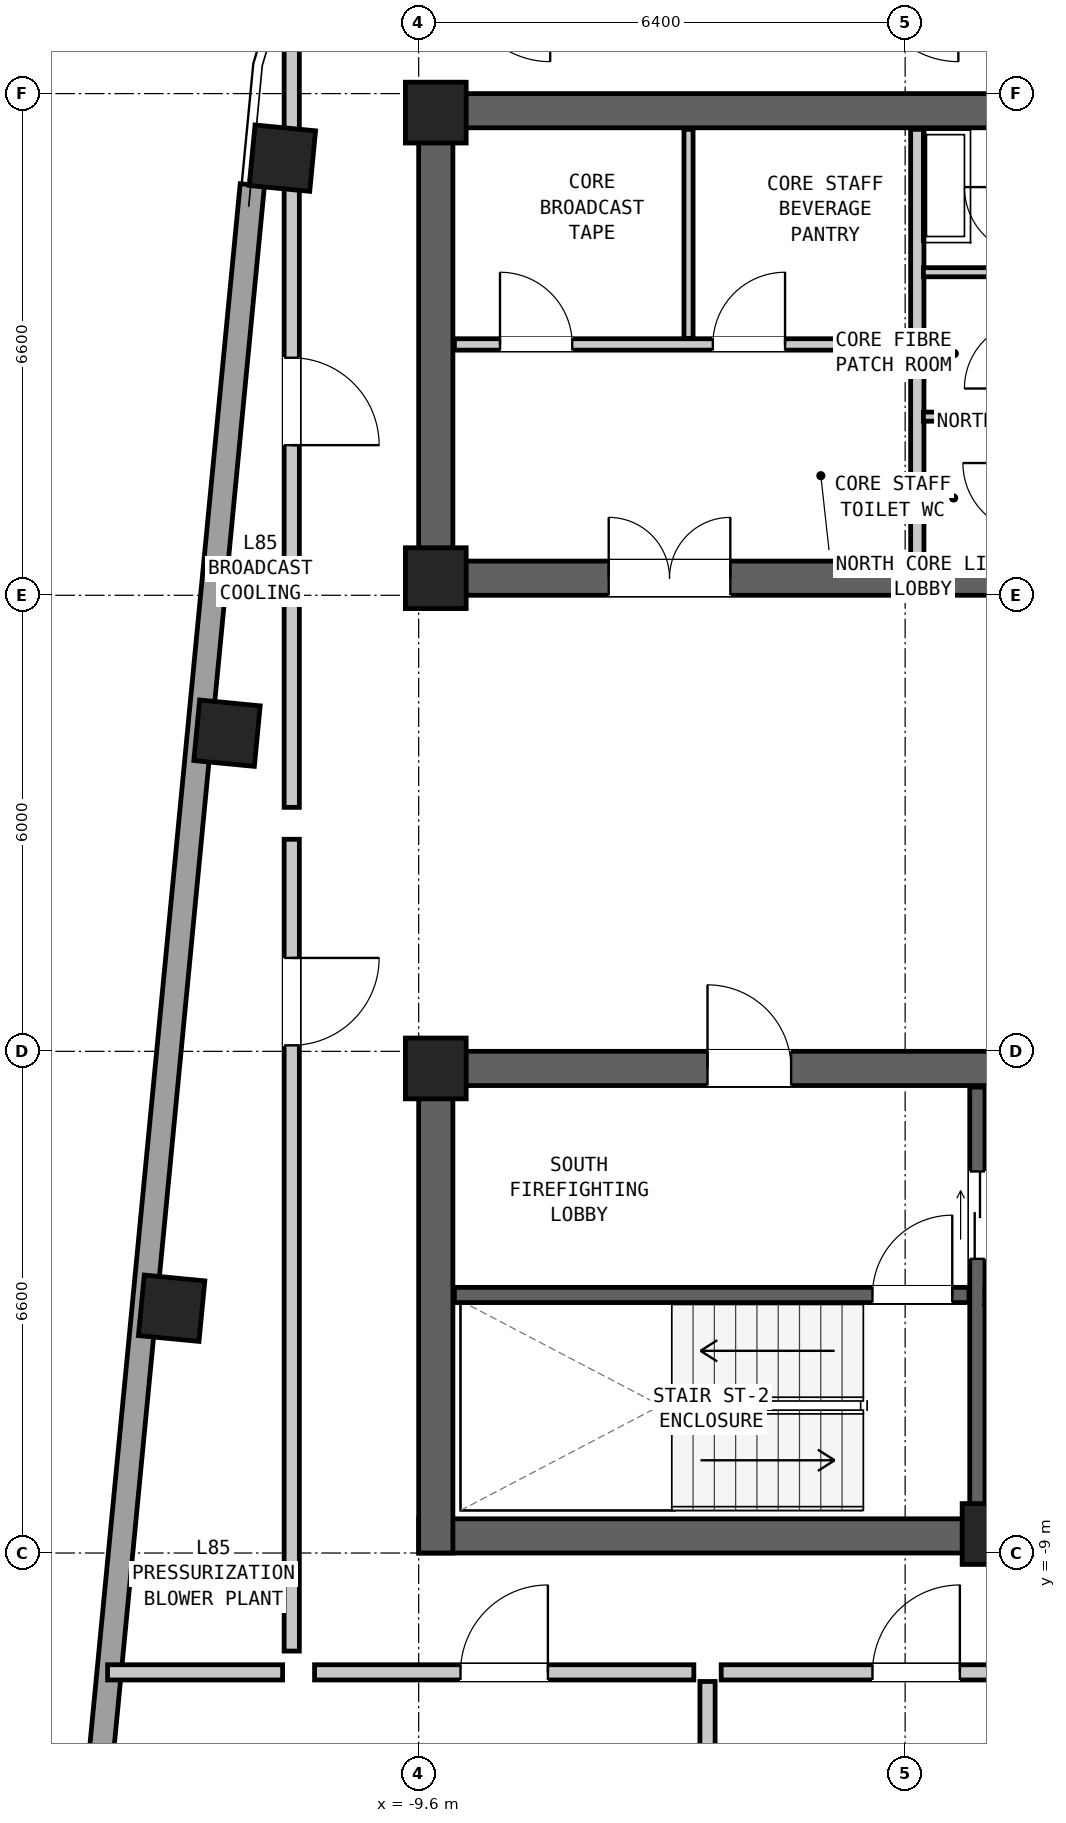
"""IFC4 building model, lengths in metres.
Left out: names, types, materials, properties, quantities, classifications, styles, units other than length and angle.
Written with IfcOpenShell. Run it as: python <this file> out.ifc"""

import sys

from ifc_helpers import new_model, si_unit, direction, frame, frame_2d, origin, origin_2d, place, context, subcontext, project, spatial, rectangle, extrude, element, fill, save


model = new_model("IFC4")
c1 = context("Model", 3, precision=1e-05, world=origin(), true_north=direction((0.0, 1.0)))
c2 = subcontext(c1, "Body", "Model", "MODEL_VIEW")
j1 = project(units=[si_unit("LENGTHUNIT", "METRE"), si_unit("PLANEANGLEUNIT", "RADIAN")], contexts=[c1])
p1 = place(None, origin())
s1 = spatial("IfcSite", under=j1, at=p1, CompositionType="ELEMENT")
p2 = place(p1, origin())
s2 = spatial("IfcBuilding", under=s1, at=p2, CompositionType="ELEMENT")
p3 = place(p2, frame((0.0, 0.0, 289.25)))
s3 = spatial("IfcBuildingStorey", under=s2, at=p3, CompositionType="ELEMENT", Elevation=289.25)
p4 = place(p3, frame((-9.6, 9.975, 0.0), z_axis=(0.0, 0.0, 1.0), x_axis=(1.0, 0.0, 0.0)))
e1 = element("IfcWall", 1, at=p4, inside=s3, PredefinedType="SHEAR", context=c2, shape_type="SweptSolid", body=[
    extrude(rectangle(XDim=19.2, YDim=0.45, at=frame_2d((9.6, 0.0))), origin(), (0.0, 0.0, 1.0), 3.6),
])
p5 = place(p3, frame((-9.6, 3.825, 0.0), z_axis=(0.0, 0.0, 1.0), x_axis=(1.0, 0.0, 0.0)))
e2 = element("IfcWall", 2, at=p5, inside=s3, PredefinedType="SHEAR", context=c2, shape_type="SweptSolid", body=[
    extrude(rectangle(XDim=19.2, YDim=0.45, at=frame_2d((9.6, 0.0))), origin(), (0.0, 0.0, 1.0), 3.6),
])
p6 = place(p5, frame((14.2, 0.0, 0.0)))
e3 = element("IfcOpeningElement", 3, at=p6, cuts=e2, PredefinedType="OPENING", context=c2, shape_type="SweptSolid", body=[
    extrude(rectangle(XDim=1.1, YDim=2.08, at=frame_2d((0.55, 1.04))), frame((0.0, 0.237, 0.0), z_axis=(0.0, -1.0, 0.0), x_axis=(1.0, 0.0, 0.0)), (0.0, 0.0, 1.0), 0.474),
])
p7 = place(p5, frame((8.2, 0.0, 0.0)))
e4 = element("IfcOpeningElement", 4, at=p7, cuts=e2, PredefinedType="OPENING", context=c2, shape_type="SweptSolid", body=[
    extrude(rectangle(XDim=1.15, YDim=2.1, at=frame_2d((0.575, 1.05))), frame((0.0, 0.237, 0.0), z_axis=(0.0, -1.0, 0.0), x_axis=(1.0, 0.0, 0.0)), (0.0, 0.0, 1.0), 0.474),
])
p8 = place(p5, frame((2.5, 0.0, 0.0)))
e5 = element("IfcOpeningElement", 5, at=p8, cuts=e2, PredefinedType="OPENING", context=c2, shape_type="SweptSolid", body=[
    extrude(rectangle(XDim=1.6, YDim=2.12, at=frame_2d((0.8, 1.06))), frame((0.0, 0.237, 0.0), z_axis=(0.0, -1.0, 0.0), x_axis=(1.0, 0.0, 0.0)), (0.0, 0.0, 1.0), 0.474),
])
p9 = place(p3, frame((-9.375, 3.6, 0.0), z_axis=(0.0, 0.0, 1.0), x_axis=(0.0, 1.0, 0.0)))
e6 = element("IfcWall", 6, at=p9, inside=s3, PredefinedType="SHEAR", context=c2, shape_type="SweptSolid", body=[
    extrude(rectangle(XDim=6.6, YDim=0.45, at=frame_2d((3.3, 0.0))), origin(), (0.0, 0.0, 1.0), 3.6),
])
p10 = place(p3, frame((-9.6, -8.775, 0.0), z_axis=(0.0, 0.0, 1.0), x_axis=(1.0, 0.0, 0.0)))
e7 = element("IfcWall", 7, at=p10, inside=s3, PredefinedType="SHEAR", context=c2, shape_type="SweptSolid", body=[
    extrude(rectangle(XDim=19.2, YDim=0.45, at=frame_2d((9.6, 0.0))), origin(), (0.0, 0.0, 1.0), 3.6),
])
p11 = place(p3, frame((-9.6, -2.625, 0.0), z_axis=(0.0, 0.0, 1.0), x_axis=(1.0, 0.0, 0.0)))
e8 = element("IfcWall", 8, at=p11, inside=s3, PredefinedType="SHEAR", context=c2, shape_type="SweptSolid", body=[
    extrude(rectangle(XDim=19.2, YDim=0.45, at=frame_2d((9.6, 0.0))), origin(), (0.0, 0.0, 1.0), 3.6),
])
p12 = place(p11, frame((3.8, 0.0, 0.0)))
e9 = element("IfcOpeningElement", 9, at=p12, cuts=e8, PredefinedType="OPENING", context=c2, shape_type="SweptSolid", body=[
    extrude(rectangle(XDim=1.1, YDim=2.08, at=frame_2d((0.55, 1.04))), frame((0.0, 0.237, 0.0), z_axis=(0.0, -1.0, 0.0), x_axis=(1.0, 0.0, 0.0)), (0.0, 0.0, 1.0), 0.474),
])
p13 = place(p11, frame((10.15, 0.0, 0.0)))
e10 = element("IfcOpeningElement", 10, at=p13, cuts=e8, PredefinedType="OPENING", context=c2, shape_type="SweptSolid", body=[
    extrude(rectangle(XDim=0.9, YDim=2.05, at=frame_2d((0.45, 1.025))), frame((0.0, 0.237, 0.0), z_axis=(0.0, -1.0, 0.0), x_axis=(1.0, 0.0, 0.0)), (0.0, 0.0, 1.0), 0.474),
])
p14 = place(p11, frame((12.1, 0.0, 0.0)))
e11 = element("IfcOpeningElement", 11, at=p14, cuts=e8, PredefinedType="OPENING", context=c2, shape_type="SweptSolid", body=[
    extrude(rectangle(XDim=0.95, YDim=2.1, at=frame_2d((0.475, 1.05))), frame((0.0, 0.237, 0.0), z_axis=(0.0, -1.0, 0.0), x_axis=(1.0, 0.0, 0.0)), (0.0, 0.0, 1.0), 0.474),
])
p15 = place(p11, frame((14.8, 0.0, 0.0)))
e12 = element("IfcOpeningElement", 12, at=p15, cuts=e8, PredefinedType="OPENING", context=c2, shape_type="SweptSolid", body=[
    extrude(rectangle(XDim=1.15, YDim=2.1, at=frame_2d((0.575, 1.05))), frame((0.0, 0.237, 0.0), z_axis=(0.0, -1.0, 0.0), x_axis=(1.0, 0.0, 0.0)), (0.0, 0.0, 1.0), 0.474),
])
p16 = place(p3, frame((-9.375, -9.0, 0.0), z_axis=(0.0, 0.0, 1.0), x_axis=(0.0, 1.0, 0.0)))
e13 = element("IfcWall", 13, at=p16, inside=s3, PredefinedType="SHEAR", context=c2, shape_type="SweptSolid", body=[
    extrude(rectangle(XDim=6.6, YDim=0.45, at=frame_2d((3.3, 0.0))), origin(), (0.0, 0.0, 1.0), 3.6),
])
for number, where, z_axis, x_axis in (
    (14, (-11.393, 9.351, 0.0), (0.0, 0.0, 1.0), (0.096, 0.995, 0.0)),
    (15, (-12.122, 1.786, 0.0), (0.0, 0.0, 1.0), (0.096, 0.995, 0.0)),
    (16, (-12.85, -5.779, 0.0), (0.0, 0.0, 1.0), (0.096, 0.995, 0.0)),
    (17, (-9.375, 9.95, 0.0), (0.0, 0.0, 1.0), (1.0, 0.0, 0.0)),
    (18, (-9.375, 3.825, 0.0), (0.0, 0.0, 1.0), (1.0, 0.0, 0.0)),
    (19, (-9.375, -2.625, 0.0), (0.0, 0.0, 1.0), (1.0, 0.0, 0.0)),
    (20, (-2.05, -8.75, 0.0), (0.0, 0.0, 1.0), (1.0, 0.0, 0.0)),
):
    element("IfcColumn", number, at=place(p3, frame(where, z_axis=z_axis, x_axis=x_axis)), inside=s3, PredefinedType="COLUMN", context=c2, shape_type="SweptSolid", body=[
        extrude(rectangle(XDim=0.8, YDim=0.8, at=origin_2d()), origin(), (0.0, 0.0, 1.0), 3.6),
    ])
p17 = place(p3, frame((-13.9, -12.924, 0.0), z_axis=(0.0, 0.0, 1.0), x_axis=(0.095843788738, 0.995396387456, 0.0)))
e21 = element("IfcWall", 21, at=p17, inside=s3, PredefinedType="SOLIDWALL", context=c2, shape_type="SweptSolid", body=[
    extrude(rectangle(XDim=22.024, YDim=0.32, at=frame_2d((11.012, 0.0))), origin(), (0.0, 0.0, 1.0), 2.182),
])
p18 = place(p3, frame((-3.04, 4.07, 0.0), z_axis=(0.0, 0.0, 1.0), x_axis=(0.0, 1.0, 0.0)))
e22 = element("IfcWall", 22, at=p18, inside=s3, PredefinedType="PARTITIONING", context=c2, shape_type="SweptSolid", body=[
    extrude(rectangle(XDim=5.66, YDim=0.175, at=frame_2d((2.83, 0.0))), origin(), (0.0, 0.0, 1.0), 3.32),
])
for number, where, z_axis, x_axis in (
    (23, (-2.96, 5.95, 0.0), (0.0, 0.0, 1.0), (1.0, 0.0, 0.0)),
    (24, (-2.96, 7.85, 0.0), (0.0, 0.0, 1.0), (1.0, 0.0, 0.0)),
):
    element("IfcWall", number, at=place(p3, frame(where, z_axis=z_axis, x_axis=x_axis)), inside=s3, PredefinedType="PARTITIONING", context=c2, shape_type="SweptSolid", body=[
        extrude(rectangle(XDim=1.36, YDim=0.12, at=frame_2d((0.68, 0.0))), origin(), (0.0, 0.0, 1.0), 3.32),
    ])
p19 = place(p3, frame((-9.13, 6.9, 0.0), z_axis=(0.0, 0.0, 1.0), x_axis=(1.0, 0.0, 0.0)))
e25 = element("IfcWall", 25, at=p19, inside=s3, PredefinedType="PARTITIONING", context=c2, shape_type="SweptSolid", body=[
    extrude(rectangle(XDim=6.01, YDim=0.15, at=frame_2d((3.005, 0.0))), origin(), (0.0, 0.0, 1.0), 3.32),
])
p20 = place(p19, frame((0.6, 0.0, 0.0)))
e26 = element("IfcOpeningElement", 26, at=p20, cuts=e25, PredefinedType="OPENING", context=c2, shape_type="SweptSolid", body=[
    extrude(rectangle(XDim=0.95, YDim=2.1, at=frame_2d((0.475, 1.05))), frame((0.0, 0.087, 0.0), z_axis=(0.0, -1.0, 0.0), x_axis=(1.0, 0.0, 0.0)), (0.0, 0.0, 1.0), 0.174),
])
p21 = place(p19, frame((3.4, 0.0, 0.0)))
e27 = element("IfcOpeningElement", 27, at=p21, cuts=e25, PredefinedType="OPENING", context=c2, shape_type="SweptSolid", body=[
    extrude(rectangle(XDim=0.95, YDim=2.1, at=frame_2d((0.475, 1.05))), frame((0.0, 0.087, 0.0), z_axis=(0.0, -1.0, 0.0), x_axis=(1.0, 0.0, 0.0)), (0.0, 0.0, 1.0), 0.174),
])
p22 = place(p3, frame((-6.05, 6.98, 0.0), z_axis=(0.0, 0.0, 1.0), x_axis=(0.0, 1.0, 0.0)))
e28 = element("IfcWall", 28, at=p22, inside=s3, PredefinedType="PARTITIONING", context=c2, shape_type="SweptSolid", body=[
    extrude(rectangle(XDim=2.75, YDim=0.12, at=frame_2d((1.375, 0.0))), origin(), (0.0, 0.0, 1.0), 3.32),
])
p23 = place(p3, frame((-9.13, -5.605, 0.0), z_axis=(0.0, 0.0, 1.0), x_axis=(1.0, 0.0, 0.0)))
e29 = element("IfcWall", 29, at=p23, inside=s3, PredefinedType="SHEAR", context=c2, shape_type="SweptSolid", body=[
    extrude(rectangle(XDim=6.77, YDim=0.2, at=frame_2d((3.385, 0.0))), origin(), (0.0, 0.0, 1.0), 3.32),
])
p24 = place(p23, frame((5.5, 0.0, 0.0)))
e30 = element("IfcOpeningElement", 30, at=p24, cuts=e29, PredefinedType="OPENING", context=c2, shape_type="SweptSolid", body=[
    extrude(rectangle(XDim=1.05, YDim=2.08, at=frame_2d((0.525, 1.04))), frame((0.0, 0.112, 0.0), z_axis=(0.0, -1.0, 0.0), x_axis=(1.0, 0.0, 0.0)), (0.0, 0.0, 1.0), 0.224),
])
p25 = place(p3, frame((-2.25, -8.53, 0.0), z_axis=(0.0, 0.0, 1.0), x_axis=(0.0, 1.0, 0.0)))
e31 = element("IfcWall", 31, at=p25, inside=s3, PredefinedType="SHEAR", context=c2, shape_type="SweptSolid", body=[
    extrude(rectangle(XDim=5.66, YDim=0.2, at=frame_2d((2.83, 0.0))), origin(), (0.0, 0.0, 1.0), 3.32),
])
p26 = place(p25, frame((3.4, 0.0, 0.0)))
e32 = element("IfcOpeningElement", 32, at=p26, cuts=e31, PredefinedType="OPENING", context=c2, shape_type="SweptSolid", body=[
    extrude(rectangle(XDim=1.15, YDim=2.08, at=frame_2d((0.575, 1.04))), frame((0.0, 0.112, 0.0), z_axis=(0.0, -1.0, 0.0), x_axis=(1.0, 0.0, 0.0)), (0.0, 0.0, 1.0), 0.224),
])
p27 = place(p3, frame((-2.15, -5.6, 0.0), z_axis=(0.0, 0.0, 1.0), x_axis=(1.0, 0.0, 0.0)))
e33 = element("IfcWall", 33, at=p27, inside=s3, PredefinedType="PARTITIONING", context=c2, shape_type="SweptSolid", body=[
    extrude(rectangle(XDim=1.97, YDim=0.175, at=frame_2d((0.985, 0.0))), origin(), (0.0, 0.0, 1.0), 3.32),
])
p28 = place(p3, frame((-10.97, -10.57, 0.0), z_axis=(0.0, 0.0, 1.0), x_axis=(1.0, 0.0, 0.0)))
e34 = element("IfcWall", 34, at=p28, inside=s3, PredefinedType="PARTITIONING", context=c2, shape_type="SweptSolid", body=[
    extrude(rectangle(XDim=4.99, YDim=0.2, at=frame_2d((2.495, 0.0))), origin(), (0.0, 0.0, 1.0), 3.32),
])
p29 = place(p28, frame((1.92, 0.0, 0.0)))
e35 = element("IfcOpeningElement", 35, at=p29, cuts=e34, PredefinedType="OPENING", context=c2, shape_type="SweptSolid", body=[
    extrude(rectangle(XDim=1.15, YDim=2.1, at=frame_2d((0.575, 1.05))), frame((0.0, 0.112, 0.0), z_axis=(0.0, -1.0, 0.0), x_axis=(1.0, 0.0, 0.0)), (0.0, 0.0, 1.0), 0.224),
])
p30 = place(p3, frame((-5.8, -19.197, 0.0), z_axis=(0.0, 0.0, 1.0), x_axis=(0.0, 1.0, 0.0)))
e36 = element("IfcWall", 36, at=p30, inside=s3, PredefinedType="PARTITIONING", context=c2, shape_type="SweptSolid", body=[
    extrude(rectangle(XDim=8.507, YDim=0.2, at=frame_2d((4.253, 0.0))), origin(), (0.0, 0.0, 1.0), 2.538),
])
p31 = place(p3, frame((-5.62, -10.57, 0.0), z_axis=(0.0, 0.0, 1.0), x_axis=(1.0, 0.0, 0.0)))
e37 = element("IfcWall", 37, at=p31, inside=s3, PredefinedType="PARTITIONING", context=c2, shape_type="SweptSolid", body=[
    extrude(rectangle(XDim=5.09, YDim=0.2, at=frame_2d((2.545, 0.0))), origin(), (0.0, 0.0, 1.0), 3.32),
])
p32 = place(p31, frame((1.99, 0.0, 0.0)))
e38 = element("IfcOpeningElement", 38, at=p32, cuts=e37, PredefinedType="OPENING", context=c2, shape_type="SweptSolid", body=[
    extrude(rectangle(XDim=1.15, YDim=2.1, at=frame_2d((0.575, 1.05))), frame((0.0, 0.112, 0.0), z_axis=(0.0, -1.0, 0.0), x_axis=(1.0, 0.0, 0.0)), (0.0, 0.0, 1.0), 0.224),
])
p33 = place(p3, frame((-13.693, -10.57, 0.0), z_axis=(0.0, 0.0, 1.0), x_axis=(1.0, 0.0, 0.0)))
e39 = element("IfcWall", 39, at=p33, inside=s3, PredefinedType="PARTITIONING", context=c2, shape_type="SweptSolid", body=[
    extrude(rectangle(XDim=2.303, YDim=0.2, at=frame_2d((1.152, 0.0))), origin(), (0.0, 0.0, 1.0), 3.32),
])
p34 = place(p3, frame((-11.27, 0.39, 0.0), z_axis=(0.0, 0.0, 1.0), x_axis=(0.0, -1.0, 0.0)))
e40 = element("IfcWall", 40, at=p34, inside=s3, PredefinedType="PARTITIONING", context=c2, shape_type="SweptSolid", body=[
    extrude(rectangle(XDim=10.68, YDim=0.2, at=frame_2d((5.34, 0.0))), origin(), (0.0, 0.0, 1.0), 3.32),
])
p35 = place(p34, frame((1.561, 0.0, 0.0)))
e41 = element("IfcOpeningElement", 41, at=p35, cuts=e40, PredefinedType="OPENING", context=c2, shape_type="SweptSolid", body=[
    extrude(rectangle(XDim=1.15, YDim=2.1, at=frame_2d((0.575, 1.05))), frame((0.0, 0.112, 0.0), z_axis=(0.0, -1.0, 0.0), x_axis=(1.0, 0.0, 0.0)), (0.0, 0.0, 1.0), 0.224),
])
p36 = place(p3, frame((-11.27, 11.49, 0.0), z_axis=(0.0, 0.0, 1.0), x_axis=(0.0, -1.0, 0.0)))
e42 = element("IfcWall", 42, at=p36, inside=s3, PredefinedType="PARTITIONING", context=c2, shape_type="SweptSolid", body=[
    extrude(rectangle(XDim=10.68, YDim=0.2, at=frame_2d((5.34, 0.0))), origin(), (0.0, 0.0, 1.0), 2.182),
])
p37 = place(p36, frame((4.765, 0.0, 0.0)))
e43 = element("IfcOpeningElement", 43, at=p37, cuts=e42, PredefinedType="OPENING", context=c2, shape_type="SweptSolid", body=[
    extrude(rectangle(XDim=1.15, YDim=2.1, at=frame_2d((0.575, 1.05))), frame((0.0, 0.112, 0.0), z_axis=(0.0, -1.0, 0.0), x_axis=(1.0, 0.0, 0.0)), (0.0, 0.0, 1.0), 0.224),
])
p38 = place(p8, origin())
e44 = element("IfcDoor", 44, at=p38, inside=s3, OperationType="DOUBLE_DOOR_SINGLE_SWING", PredefinedType="DOOR", context=c2, shape_type="SweptSolid", body=[
    extrude(rectangle(XDim=1.6, YDim=2.12, at=frame_2d((0.8, 1.06))), frame((0.0, 0.025, 0.0), z_axis=(0.0, -1.0, 0.0), x_axis=(1.0, 0.0, 0.0)), (0.0, 0.0, 1.0), 0.05),
])
fill(e5, e44)
p39 = place(p20, origin())
e45 = element("IfcDoor", 45, at=p39, inside=s3, OperationType="SINGLE_SWING_LEFT", PredefinedType="DOOR", context=c2, shape_type="SweptSolid", body=[
    extrude(rectangle(XDim=0.95, YDim=2.1, at=frame_2d((0.475, 1.05))), frame((0.0, 0.025, 0.0), z_axis=(0.0, -1.0, 0.0), x_axis=(1.0, 0.0, 0.0)), (0.0, 0.0, 1.0), 0.05),
])
fill(e26, e45)
p40 = place(p21, origin())
e46 = element("IfcDoor", 46, at=p40, inside=s3, OperationType="SINGLE_SWING_RIGHT", PredefinedType="DOOR", context=c2, shape_type="SweptSolid", body=[
    extrude(rectangle(XDim=0.95, YDim=2.1, at=frame_2d((0.475, 1.05))), frame((0.0, 0.025, 0.0), z_axis=(0.0, -1.0, 0.0), x_axis=(1.0, 0.0, 0.0)), (0.0, 0.0, 1.0), 0.05),
])
fill(e27, e46)
p41 = place(p24, origin())
e47 = element("IfcDoor", 47, at=p41, inside=s3, OperationType="SINGLE_SWING_RIGHT", PredefinedType="DOOR", context=c2, shape_type="SweptSolid", body=[
    extrude(rectangle(XDim=1.05, YDim=2.08, at=frame_2d((0.525, 1.04))), frame((0.0, 0.025, 0.0), z_axis=(0.0, -1.0, 0.0), x_axis=(1.0, 0.0, 0.0)), (0.0, 0.0, 1.0), 0.05),
])
fill(e30, e47)
p42 = place(p12, origin())
e48 = element("IfcDoor", 48, at=p42, inside=s3, OperationType="SINGLE_SWING_LEFT", PredefinedType="DOOR", context=c2, shape_type="SweptSolid", body=[
    extrude(rectangle(XDim=1.1, YDim=2.08, at=frame_2d((0.55, 1.04))), frame((0.0, 0.025, 0.0), z_axis=(0.0, -1.0, 0.0), x_axis=(1.0, 0.0, 0.0)), (0.0, 0.0, 1.0), 0.05),
])
fill(e9, e48)
p43 = place(p26, origin())
e49 = element("IfcDoor", 49, at=p43, inside=s3, OperationType="DOUBLE_DOOR_SLIDING", PredefinedType="DOOR", context=c2, shape_type="SweptSolid", body=[
    extrude(rectangle(XDim=1.15, YDim=2.08, at=frame_2d((0.575, 1.04))), frame((0.0, 0.025, 0.0), z_axis=(0.0, -1.0, 0.0), x_axis=(1.0, 0.0, 0.0)), (0.0, 0.0, 1.0), 0.05),
])
fill(e32, e49)
p44 = place(p29, origin())
e50 = element("IfcDoor", 50, at=p44, inside=s3, OperationType="SINGLE_SWING_RIGHT", PredefinedType="DOOR", context=c2, shape_type="SweptSolid", body=[
    extrude(rectangle(XDim=1.15, YDim=2.1, at=frame_2d((0.575, 1.05))), frame((0.0, 0.025, 0.0), z_axis=(0.0, -1.0, 0.0), x_axis=(1.0, 0.0, 0.0)), (0.0, 0.0, 1.0), 0.05),
])
fill(e35, e50)
p45 = place(p32, origin())
e51 = element("IfcDoor", 51, at=p45, inside=s3, OperationType="SINGLE_SWING_RIGHT", PredefinedType="DOOR", context=c2, shape_type="SweptSolid", body=[
    extrude(rectangle(XDim=1.15, YDim=2.1, at=frame_2d((0.575, 1.05))), frame((0.0, 0.025, 0.0), z_axis=(0.0, -1.0, 0.0), x_axis=(1.0, 0.0, 0.0)), (0.0, 0.0, 1.0), 0.05),
])
fill(e38, e51)
p46 = place(p35, origin())
e52 = element("IfcDoor", 52, at=p46, inside=s3, OperationType="SINGLE_SWING_LEFT", PredefinedType="DOOR", context=c2, shape_type="SweptSolid", body=[
    extrude(rectangle(XDim=1.15, YDim=2.1, at=frame_2d((0.575, 1.05))), frame((0.0, 0.025, 0.0), z_axis=(0.0, -1.0, 0.0), x_axis=(1.0, 0.0, 0.0)), (0.0, 0.0, 1.0), 0.05),
])
fill(e41, e52)
p47 = place(p37, origin())
e53 = element("IfcDoor", 53, at=p47, inside=s3, OperationType="SINGLE_SWING_RIGHT", PredefinedType="DOOR", context=c2, shape_type="SweptSolid", body=[
    extrude(rectangle(XDim=1.15, YDim=2.1, at=frame_2d((0.575, 1.05))), frame((0.0, 0.025, 0.0), z_axis=(0.0, -1.0, 0.0), x_axis=(1.0, 0.0, 0.0)), (0.0, 0.0, 1.0), 0.05),
])
fill(e43, e53)
save(model, sys.argv[1])
